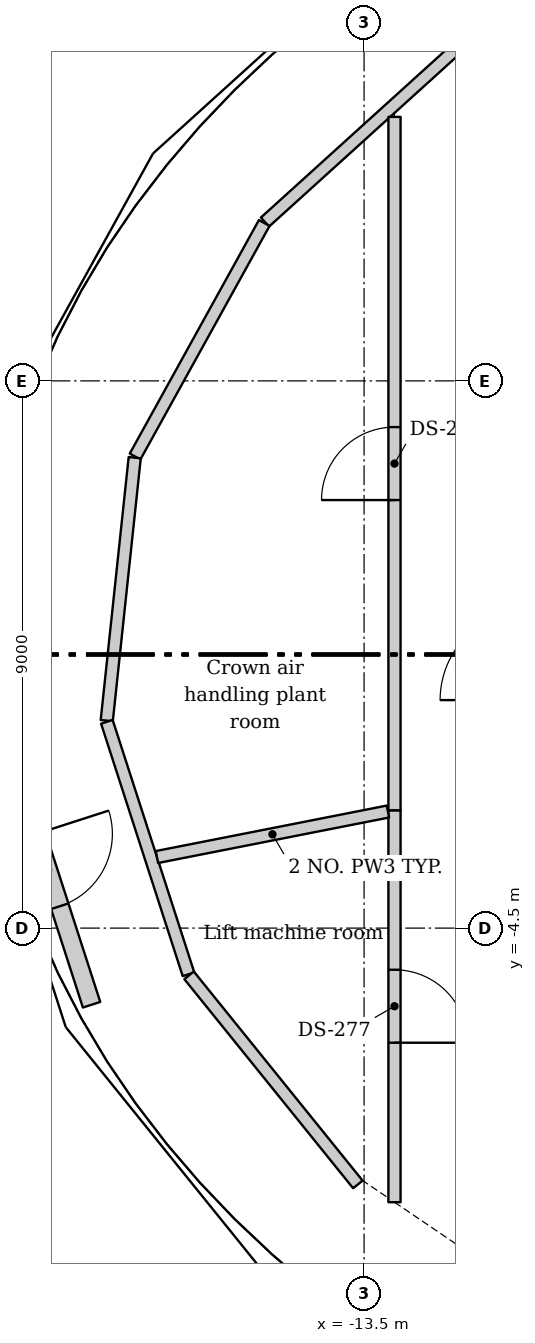
"""IFC4 building model, lengths in metres.
Left out: names, types, materials, properties, quantities, classifications, styles, units other than length and angle.
Written with IfcOpenShell. Run it as: python <this file> out.ifc"""

import sys

from ifc_helpers import new_model, si_unit, direction, frame, frame_2d, origin, place, context, subcontext, project, spatial, rectangle, extrude, source, transform, mapped, element, fill, save


model = new_model("IFC4")
c1 = context("Model", 3, precision=1e-05, world=origin(), true_north=direction((0.0, 1.0)))
c2 = subcontext(c1, "Body", "Model", "MODEL_VIEW")
j1 = project(units=[si_unit("LENGTHUNIT", "METRE"), si_unit("PLANEANGLEUNIT", "RADIAN")], contexts=[c1])
p1 = place(None, origin())
s1 = spatial("IfcSite", under=j1, at=p1, CompositionType="ELEMENT")
p2 = place(p1, origin())
s2 = spatial("IfcBuilding", under=s1, at=p2, CompositionType="ELEMENT")
p3 = place(p2, frame((0.0, 0.0, 352.0)))
s3 = spatial("IfcBuildingStorey", under=s2, at=p3, CompositionType="ELEMENT", Elevation=352.0)
m1 = source(origin(), c2, "Body", "SweptSolid", [
    extrude(rectangle(XDim=4.449, YDim=0.2, at=frame_2d((2.225, 0.0))), origin(), (0.0, 0.0, 1.0), 4.0),
])
p4 = place(p3, frame((-15.13, 7.112, 0.0), z_axis=(0.0, 0.0, 1.0), x_axis=(0.741145642432, 0.671344275841, 0.0)))
e1 = element("IfcWall", 1, at=p4, inside=s3, PredefinedType="SOLIDWALL", context=c2, shape_type="MappedRepresentation", body=[
    mapped(m1, transform((0.0, 0.0, 0.0))),
])
m2 = source(origin(), c2, "Body", "SweptSolid", [
    extrude(rectangle(XDim=4.389, YDim=0.2, at=frame_2d((2.194, 0.0))), origin(), (0.0, 0.0, 1.0), 4.0),
])
p5 = place(p3, frame((-17.266, 3.256, 0.0), z_axis=(0.0, 0.0, 1.0), x_axis=(0.48394176174, 0.875100206402, 0.0)))
e2 = element("IfcWall", 2, at=p5, inside=s3, PredefinedType="SOLIDWALL", context=c2, shape_type="MappedRepresentation", body=[
    mapped(m2, transform((0.0, 0.0, 0.0))),
])
m3 = source(origin(), c2, "Body", "SweptSolid", [
    extrude(rectangle(XDim=4.349, YDim=0.2, at=frame_2d((2.175, 0.0))), origin(), (0.0, 0.0, 1.0), 4.0),
])
p6 = place(p3, frame((-17.732, -1.088, 0.0), z_axis=(0.0, 0.0, 1.0), x_axis=(0.10576007222, 0.994391676918, 0.0)))
e3 = element("IfcWall", 3, at=p6, inside=s3, PredefinedType="SOLIDWALL", context=c2, shape_type="MappedRepresentation", body=[
    mapped(m3, transform((0.0, 0.0, 0.0))),
])
m4 = source(origin(), c2, "Body", "SweptSolid", [
    extrude(rectangle(XDim=4.364, YDim=0.2, at=frame_2d((2.182, 0.0))), origin(), (0.0, 0.0, 1.0), 4.0),
])
p7 = place(p3, frame((-16.388, -5.26, 0.0), z_axis=(0.0, 0.0, 1.0), x_axis=(-0.307571534743, 0.951524960795, 0.0)))
e4 = element("IfcWall", 4, at=p7, inside=s3, PredefinedType="SOLIDWALL", context=c2, shape_type="MappedRepresentation", body=[
    mapped(m4, transform((0.0, 0.0, 0.0))),
])
m5 = source(origin(), c2, "Body", "SweptSolid", [
    extrude(rectangle(XDim=4.419, YDim=0.2, at=frame_2d((2.209, 0.0))), origin(), (0.0, 0.0, 1.0), 4.0),
])
p8 = place(p3, frame((-13.602, -8.716, 0.0), z_axis=(0.0, 0.0, 1.0), x_axis=(-0.628124910936, 0.778112521594, 0.0)))
e5 = element("IfcWall", 5, at=p8, inside=s3, PredefinedType="SOLIDWALL", context=c2, shape_type="MappedRepresentation", body=[
    mapped(m5, transform((0.0, 0.0, 0.0))),
])
m6 = source(origin(), c2, "Body", "SweptSolid", [
    extrude(rectangle(XDim=4.645, YDim=0.3, at=frame_2d((2.322, 0.0))), origin(), (0.0, 0.0, 1.0), 2.6),
])
p9 = place(p3, frame((-19.41, -1.341, 0.0), z_axis=(0.0, 0.0, 1.0), x_axis=(0.307431215292, -0.951570306317, 0.0)))
e6 = element("IfcWall", 6, at=p9, inside=s3, PredefinedType="SOLIDWALL", context=c2, shape_type="MappedRepresentation", body=[
    mapped(m6, transform((0.0, 0.0, 0.0))),
])
m7 = source(origin(), c2, "Body", "SweptSolid", [
    extrude(rectangle(XDim=1.25, YDim=2.3, at=frame_2d((0.625, 1.15))), frame((0.0, 0.16, 0.0), z_axis=(0.0, -1.0, 0.0), x_axis=(1.0, 0.0, 0.0)), (0.0, 0.0, 1.0), 0.32),
])
p10 = place(p9, frame((1.693, 0.0, 0.0)))
e7 = element("IfcOpeningElement", 7, at=p10, cuts=e6, PredefinedType="OPENING", context=c2, shape_type="MappedRepresentation", body=[
    mapped(m7, transform((0.0, 0.0, 0.0))),
])
m8 = source(origin(), c2, "Body", "SweptSolid", [
    extrude(rectangle(XDim=6.446, YDim=0.2, at=frame_2d((3.223, 0.0))), origin(), (0.0, 0.0, 1.0), 4.0),
])
p11 = place(p3, frame((-13.0, -9.008, 0.0), z_axis=(0.0, 0.0, 1.0), x_axis=(0.0, 1.0, 0.0)))
e8 = element("IfcWall", 8, at=p11, inside=s3, PredefinedType="PARTITIONING", context=c2, shape_type="MappedRepresentation", body=[
    mapped(m8, transform((0.0, 0.0, 0.0))),
])
m9 = source(origin(), c2, "Body", "SweptSolid", [
    extrude(rectangle(XDim=1.2, YDim=2.1, at=frame_2d((0.6, 1.05))), frame((0.0, 0.11, 0.0), z_axis=(0.0, -1.0, 0.0), x_axis=(1.0, 0.0, 0.0)), (0.0, 0.0, 1.0), 0.22),
])
p12 = place(p11, frame((2.623, 0.0, 0.0)))
e9 = element("IfcOpeningElement", 9, at=p12, cuts=e8, PredefinedType="OPENING", context=c2, shape_type="MappedRepresentation", body=[
    mapped(m9, transform((0.0, 0.0, 0.0))),
])
m10 = source(origin(), c2, "Body", "SweptSolid", [
    extrude(rectangle(XDim=3.871, YDim=0.2, at=frame_2d((1.936, 0.0))), origin(), (0.0, 0.0, 1.0), 4.0),
])
p13 = place(p3, frame((-13.108, -2.583, 0.0), z_axis=(0.0, 0.0, 1.0), x_axis=(-0.981151353157, -0.193240839884, 0.0)))
e10 = element("IfcWall", 10, at=p13, inside=s3, PredefinedType="PARTITIONING", context=c2, shape_type="MappedRepresentation", body=[
    mapped(m10, transform((0.0, 0.0, 0.0))),
])
m11 = source(origin(), c2, "Body", "SweptSolid", [
    extrude(rectangle(XDim=11.404, YDim=0.2, at=frame_2d((5.702, 0.0))), origin(), (0.0, 0.0, 1.0), 4.0),
])
p14 = place(p3, frame((-13.0, -2.562, 0.0), z_axis=(0.0, 0.0, 1.0), x_axis=(0.0, 1.0, 0.0)))
e11 = element("IfcWall", 11, at=p14, inside=s3, PredefinedType="PARTITIONING", context=c2, shape_type="MappedRepresentation", body=[
    mapped(m11, transform((0.0, 0.0, 0.0))),
])
p15 = place(p14, frame((5.102, 0.0, 0.0)))
e12 = element("IfcOpeningElement", 12, at=p15, cuts=e11, PredefinedType="OPENING", context=c2, shape_type="MappedRepresentation", body=[
    mapped(m9, transform((0.0, 0.0, 0.0))),
])
m12 = source(origin(), c2, "Body", "SweptSolid", [
    extrude(rectangle(XDim=1.25, YDim=2.3, at=frame_2d((0.625, 1.15))), frame((0.0, 0.025, 0.0), z_axis=(0.0, -1.0, 0.0), x_axis=(1.0, 0.0, 0.0)), (0.0, 0.0, 1.0), 0.05),
])
p16 = place(p10, origin())
e13 = element("IfcDoor", 13, at=p16, inside=s3, OperationType="SINGLE_SWING_LEFT", PredefinedType="DOOR", context=c2, shape_type="MappedRepresentation", body=[
    mapped(m12, transform((0.0, 0.0, 0.0))),
])
fill(e7, e13)
m13 = source(origin(), c2, "Body", "SweptSolid", [
    extrude(rectangle(XDim=1.2, YDim=2.1, at=frame_2d((0.6, 1.05))), frame((0.0, 0.025, 0.0), z_axis=(0.0, -1.0, 0.0), x_axis=(1.0, 0.0, 0.0)), (0.0, 0.0, 1.0), 0.05),
])
p17 = place(p15, origin())
e14 = element("IfcDoor", 14, at=p17, inside=s3, OperationType="SINGLE_SWING_LEFT", PredefinedType="DOOR", context=c2, shape_type="MappedRepresentation", body=[
    mapped(m13, transform((0.0, 0.0, 0.0))),
])
fill(e12, e14)
p18 = place(p12, origin())
e15 = element("IfcDoor", 15, at=p18, inside=s3, OperationType="SINGLE_SWING_LEFT", PredefinedType="DOOR", context=c2, shape_type="MappedRepresentation", body=[
    mapped(m13, transform((0.0, 0.0, 0.0))),
])
fill(e9, e15)
save(model, sys.argv[1])
